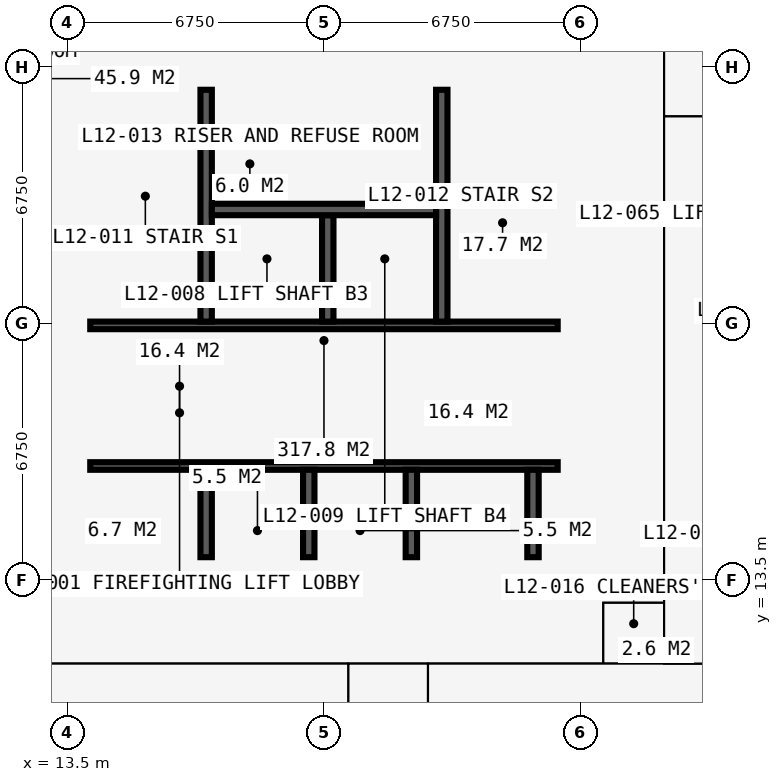
"""IFC4 building model, lengths in metres.
Left out: names, types, materials, properties, quantities, classifications, styles, units other than length and angle.
Written with IfcOpenShell. Run it as: python <this file> out.ifc"""

import sys

from ifc_helpers import new_model, si_unit, direction, frame, frame_2d, origin, place, context, subcontext, project, spatial, rectangle, extrude, element, fill, save


model = new_model("IFC4")
c1 = context("Model", 3, precision=1e-05, world=origin(), true_north=direction((0.0, 1.0)))
c2 = subcontext(c1, "Body", "Model", "MODEL_VIEW")
j1 = project(units=[si_unit("LENGTHUNIT", "METRE"), si_unit("PLANEANGLEUNIT", "RADIAN")], contexts=[c1])
p1 = place(None, origin())
s1 = spatial("IfcSite", under=j1, at=p1, CompositionType="ELEMENT")
p2 = place(p1, origin())
s2 = spatial("IfcBuilding", under=s1, at=p2, CompositionType="ELEMENT")
p3 = place(p2, frame((0.0, 0.0, 46.8)))
s3 = spatial("IfcBuildingStorey", under=s2, at=p3, CompositionType="ELEMENT", Elevation=46.8)
p4 = place(p3, frame((12.9, 13.5, 0.0), z_axis=(0.0, 0.0, 1.0), x_axis=(1.0, 0.0, 0.0)))
e1 = element("IfcWall", 1, at=p4, inside=s3, PredefinedType="SHEAR", context=c2, shape_type="SweptSolid", body=[
    extrude(rectangle(XDim=14.7, YDim=1.2, at=frame_2d((7.35, 0.0))), origin(), (0.0, 0.0, 1.0), 3.6),
])
p5 = place(p3, frame((27.0, 14.1, 0.0), z_axis=(0.0, 0.0, 1.0), x_axis=(0.0, 1.0, 0.0)))
e2 = element("IfcWall", 2, at=p5, inside=s3, PredefinedType="SHEAR", context=c2, shape_type="SweptSolid", body=[
    extrude(rectangle(XDim=12.3, YDim=1.2, at=frame_2d((6.15, 0.0))), origin(), (0.0, 0.0, 1.0), 3.6),
])
p6 = place(p5, frame((3.65, 0.0, 0.0)))
e3 = element("IfcOpeningElement", 3, at=p6, cuts=e2, PredefinedType="OPENING", context=c2, shape_type="SweptSolid", body=[
    extrude(rectangle(XDim=1.2, YDim=2.2, at=frame_2d((0.6, 1.1))), frame((0.0, 0.61, 0.0), z_axis=(0.0, -1.0, 0.0), x_axis=(1.0, 0.0, 0.0)), (0.0, 0.0, 1.0), 1.22),
])
p7 = place(p3, frame((27.6, 27.0, 0.0), z_axis=(0.0, 0.0, 1.0), x_axis=(-1.0, 0.0, 0.0)))
e4 = element("IfcWall", 4, at=p7, inside=s3, PredefinedType="SHEAR", context=c2, shape_type="SweptSolid", body=[
    extrude(rectangle(XDim=14.7, YDim=1.2, at=frame_2d((7.35, 0.0))), origin(), (0.0, 0.0, 1.0), 3.6),
])
p8 = place(p7, frame((5.225, 0.0, 0.0)))
e5 = element("IfcOpeningElement", 5, at=p8, cuts=e4, PredefinedType="OPENING", context=c2, shape_type="SweptSolid", body=[
    extrude(rectangle(XDim=0.9, YDim=2.2, at=frame_2d((0.45, 1.1))), frame((0.0, 0.61, 0.0), z_axis=(0.0, -1.0, 0.0), x_axis=(1.0, 0.0, 0.0)), (0.0, 0.0, 1.0), 1.22),
])
p9 = place(p7, frame((8.2, 0.0, 0.0)))
e6 = element("IfcOpeningElement", 6, at=p9, cuts=e4, PredefinedType="OPENING", context=c2, shape_type="SweptSolid", body=[
    extrude(rectangle(XDim=1.0, YDim=2.2, at=frame_2d((0.5, 1.1))), frame((0.0, 0.61, 0.0), z_axis=(0.0, -1.0, 0.0), x_axis=(1.0, 0.0, 0.0)), (0.0, 0.0, 1.0), 1.22),
])
p10 = place(p3, frame((13.5, 26.4, 0.0), z_axis=(0.0, 0.0, 1.0), x_axis=(0.0, -1.0, 0.0)))
e7 = element("IfcWall", 7, at=p10, inside=s3, PredefinedType="SHEAR", context=c2, shape_type="SweptSolid", body=[
    extrude(rectangle(XDim=12.3, YDim=1.2, at=frame_2d((6.15, 0.0))), origin(), (0.0, 0.0, 1.0), 3.6),
])
p11 = place(p10, frame((7.45, 0.0, 0.0)))
e8 = element("IfcOpeningElement", 8, at=p11, cuts=e7, PredefinedType="OPENING", context=c2, shape_type="SweptSolid", body=[
    extrude(rectangle(XDim=1.2, YDim=2.2, at=frame_2d((0.6, 1.1))), frame((0.0, 0.61, 0.0), z_axis=(0.0, -1.0, 0.0), x_axis=(1.0, 0.0, 0.0)), (0.0, 0.0, 1.0), 1.22),
])
p12 = place(p3, frame((14.1, 16.5, 0.0), z_axis=(0.0, 0.0, 1.0), x_axis=(1.0, 0.0, 0.0)))
e9 = element("IfcWall", 9, at=p12, inside=s3, PredefinedType="SHEAR", context=c2, shape_type="SweptSolid", body=[
    extrude(rectangle(XDim=12.3, YDim=0.2, at=frame_2d((6.15, 0.0))), origin(), (0.0, 0.0, 1.0), 3.6),
])
p13 = place(p12, frame((0.9, 0.0, 0.0)))
e10 = element("IfcOpeningElement", 10, at=p13, cuts=e9, PredefinedType="OPENING", context=c2, shape_type="SweptSolid", body=[
    extrude(rectangle(XDim=1.1, YDim=2.2, at=frame_2d((0.55, 1.1))), frame((0.0, 0.11, 0.0), z_axis=(0.0, -1.0, 0.0), x_axis=(1.0, 0.0, 0.0)), (0.0, 0.0, 1.0), 0.22),
])
p14 = place(p12, frame((9.5, 0.0, 0.0)))
e11 = element("IfcOpeningElement", 11, at=p14, cuts=e9, PredefinedType="OPENING", context=c2, shape_type="SweptSolid", body=[
    extrude(rectangle(XDim=1.1, YDim=2.2, at=frame_2d((0.55, 1.1))), frame((0.0, 0.11, 0.0), z_axis=(0.0, -1.0, 0.0), x_axis=(1.0, 0.0, 0.0)), (0.0, 0.0, 1.0), 0.22),
])
p15 = place(p3, frame((14.1, 20.2, 0.0), z_axis=(0.0, 0.0, 1.0), x_axis=(1.0, 0.0, 0.0)))
e12 = element("IfcWall", 12, at=p15, inside=s3, PredefinedType="SHEAR", context=c2, shape_type="SweptSolid", body=[
    extrude(rectangle(XDim=12.3, YDim=0.2, at=frame_2d((6.15, 0.0))), origin(), (0.0, 0.0, 1.0), 3.6),
])
p16 = place(p15, frame((0.35, 0.0, 0.0)))
e13 = element("IfcOpeningElement", 13, at=p16, cuts=e12, PredefinedType="OPENING", context=c2, shape_type="SweptSolid", body=[
    extrude(rectangle(XDim=1.1, YDim=2.2, at=frame_2d((0.55, 1.1))), frame((0.0, 0.11, 0.0), z_axis=(0.0, -1.0, 0.0), x_axis=(1.0, 0.0, 0.0)), (0.0, 0.0, 1.0), 0.22),
])
p17 = place(p15, frame((9.75, 0.0, 0.0)))
e14 = element("IfcOpeningElement", 14, at=p17, cuts=e12, PredefinedType="OPENING", context=c2, shape_type="SweptSolid", body=[
    extrude(rectangle(XDim=1.1, YDim=2.2, at=frame_2d((0.55, 1.1))), frame((0.0, 0.11, 0.0), z_axis=(0.0, -1.0, 0.0), x_axis=(1.0, 0.0, 0.0)), (0.0, 0.0, 1.0), 0.22),
])
for number, where, z_axis, x_axis in (
    (15, (17.15, 20.3, 0.0), (0.0, 0.0, 1.0), (0.0, 1.0, 0.0)),
    (16, (23.35, 20.3, 0.0), (0.0, 0.0, 1.0), (0.0, 1.0, 0.0)),
):
    element("IfcWall", number, at=place(p3, frame(where, z_axis=z_axis, x_axis=x_axis)), inside=s3, PredefinedType="SHEAR", context=c2, shape_type="SweptSolid", body=[
        extrude(rectangle(XDim=6.1, YDim=0.3, at=frame_2d((3.05, 0.0))), origin(), (0.0, 0.0, 1.0), 3.6),
    ])
p18 = place(p3, frame((20.35, 20.3, 0.0), z_axis=(0.0, 0.0, 1.0), x_axis=(0.0, 1.0, 0.0)))
e17 = element("IfcWall", 17, at=p18, inside=s3, PredefinedType="SHEAR", context=c2, shape_type="SweptSolid", body=[
    extrude(rectangle(XDim=2.8, YDim=0.3, at=frame_2d((1.4, 0.0))), origin(), (0.0, 0.0, 1.0), 3.6),
])
p19 = place(p3, frame((17.3, 23.25, 0.0), z_axis=(0.0, 0.0, 1.0), x_axis=(1.0, 0.0, 0.0)))
e18 = element("IfcWall", 18, at=p19, inside=s3, PredefinedType="SHEAR", context=c2, shape_type="SweptSolid", body=[
    extrude(rectangle(XDim=5.9, YDim=0.3, at=frame_2d((2.95, 0.0))), origin(), (0.0, 0.0, 1.0), 3.6),
])
for number, where, z_axis, x_axis in (
    (19, (17.15, 14.1, 0.0), (0.0, 0.0, 1.0), (0.0, 1.0, 0.0)),
    (20, (19.85, 14.1, 0.0), (0.0, 0.0, 1.0), (0.0, 1.0, 0.0)),
    (21, (22.55, 14.1, 0.0), (0.0, 0.0, 1.0), (0.0, 1.0, 0.0)),
    (22, (25.75, 14.1, 0.0), (0.0, 0.0, 1.0), (0.0, 1.0, 0.0)),
):
    element("IfcWall", number, at=place(p3, frame(where, z_axis=z_axis, x_axis=x_axis)), inside=s3, PredefinedType="SHEAR", context=c2, shape_type="SweptSolid", body=[
        extrude(rectangle(XDim=2.3, YDim=0.3, at=frame_2d((1.15, 0.0))), origin(), (0.0, 0.0, 1.0), 3.6),
    ])
p20 = place(p3, frame((18.875, 16.6, 0.0), z_axis=(0.0, 0.0, 1.0), x_axis=(0.0, 1.0, 0.0)))
e23 = element("IfcWall", 23, at=p20, inside=s3, PredefinedType="PARTITIONING", context=c2, shape_type="SweptSolid", body=[
    extrude(rectangle(XDim=3.5, YDim=0.15, at=frame_2d((1.75, 0.0))), origin(), (0.0, 0.0, 1.0), 3.375),
])
p21 = place(p20, frame((1.15, 0.0, 0.0)))
e24 = element("IfcOpeningElement", 24, at=p21, cuts=e23, PredefinedType="OPENING", context=c2, shape_type="SweptSolid", body=[
    extrude(rectangle(XDim=1.2, YDim=2.2, at=frame_2d((0.6, 1.1))), frame((0.0, 0.085, 0.0), z_axis=(0.0, -1.0, 0.0), x_axis=(1.0, 0.0, 0.0)), (0.0, 0.0, 1.0), 0.17),
])
p22 = place(p3, frame((21.625, 16.6, 0.0), z_axis=(0.0, 0.0, 1.0), x_axis=(0.0, 1.0, 0.0)))
e25 = element("IfcWall", 25, at=p22, inside=s3, PredefinedType="PARTITIONING", context=c2, shape_type="SweptSolid", body=[
    extrude(rectangle(XDim=3.5, YDim=0.15, at=frame_2d((1.75, 0.0))), origin(), (0.0, 0.0, 1.0), 3.375),
])
p23 = place(p22, frame((1.15, 0.0, 0.0)))
e26 = element("IfcOpeningElement", 26, at=p23, cuts=e25, PredefinedType="OPENING", context=c2, shape_type="SweptSolid", body=[
    extrude(rectangle(XDim=1.2, YDim=2.2, at=frame_2d((0.6, 1.1))), frame((0.0, 0.085, 0.0), z_axis=(0.0, -1.0, 0.0), x_axis=(1.0, 0.0, 0.0)), (0.0, 0.0, 1.0), 0.17),
])
p24 = place(p3, frame((19.375, 23.4, 0.0), z_axis=(0.0, 0.0, 1.0), x_axis=(0.0, 1.0, 0.0)))
e27 = element("IfcWall", 27, at=p24, inside=s3, PredefinedType="PARTITIONING", context=c2, shape_type="SweptSolid", body=[
    extrude(rectangle(XDim=3.0, YDim=0.15, at=frame_2d((1.5, 0.0))), origin(), (0.0, 0.0, 1.0), 3.375),
])
p25 = place(p3, frame((10.125, 11.3, 0.0), z_axis=(0.0, 0.0, 1.0), x_axis=(1.0, 0.0, 0.0)))
e28 = element("IfcWall", 28, at=p25, inside=s3, PredefinedType="PARTITIONING", context=c2, shape_type="SweptSolid", body=[
    extrude(rectangle(XDim=20.675, YDim=0.15, at=frame_2d((10.337, 0.0))), origin(), (0.0, 0.0, 1.0), 3.375),
])
p26 = place(p25, frame((11.312, 0.0, 0.0)))
e29 = element("IfcOpeningElement", 29, at=p26, cuts=e28, PredefinedType="OPENING", context=c2, shape_type="SweptSolid", body=[
    extrude(rectangle(XDim=1.0, YDim=2.2, at=frame_2d((0.5, 1.1))), frame((0.0, 0.085, 0.0), z_axis=(0.0, -1.0, 0.0), x_axis=(1.0, 0.0, 0.0)), (0.0, 0.0, 1.0), 0.17),
])
for number, where, z_axis, x_axis in (
    (30, (20.887, 5.65, 0.0), (0.0, 0.0, 1.0), (0.0, 1.0, 0.0)),
    (31, (22.988, 5.65, 0.0), (0.0, 0.0, 1.0), (0.0, 1.0, 0.0)),
):
    element("IfcWall", number, at=place(p3, frame(where, z_axis=z_axis, x_axis=x_axis)), inside=s3, PredefinedType="PARTITIONING", context=c2, shape_type="SweptSolid", body=[
        extrude(rectangle(XDim=5.65, YDim=0.15, at=frame_2d((2.825, 0.0))), origin(), (0.0, 0.0, 1.0), 3.375),
    ])
p27 = place(p3, frame((27.6, 11.3, 0.0), z_axis=(0.0, 0.0, 1.0), x_axis=(0.0, 1.0, 0.0)))
e32 = element("IfcWall", 32, at=p27, inside=s3, PredefinedType="PARTITIONING", context=c2, shape_type="SweptSolid", body=[
    extrude(rectangle(XDim=1.6, YDim=0.15, at=frame_2d((0.8, 0.0))), origin(), (0.0, 0.0, 1.0), 3.375),
])
p28 = place(p27, frame((0.3, 0.0, 0.0)))
e33 = element("IfcOpeningElement", 33, at=p28, cuts=e32, PredefinedType="OPENING", context=c2, shape_type="SweptSolid", body=[
    extrude(rectangle(XDim=0.95, YDim=2.2, at=frame_2d((0.475, 1.1))), frame((0.0, 0.085, 0.0), z_axis=(0.0, -1.0, 0.0), x_axis=(1.0, 0.0, 0.0)), (0.0, 0.0, 1.0), 0.17),
])
p29 = place(p3, frame((27.6, 12.9, 0.0), z_axis=(0.0, 0.0, 1.0), x_axis=(1.0, 0.0, 0.0)))
e34 = element("IfcWall", 34, at=p29, inside=s3, PredefinedType="PARTITIONING", context=c2, shape_type="SweptSolid", body=[
    extrude(rectangle(XDim=1.6, YDim=0.15, at=frame_2d((0.8, 0.0))), origin(), (0.0, 0.0, 1.0), 2.877),
])
p30 = place(p3, frame((29.2, 11.3, 0.0), z_axis=(0.0, 0.0, 1.0), x_axis=(0.0, 1.0, 0.0)))
e35 = element("IfcWall", 35, at=p30, inside=s3, PredefinedType="PARTITIONING", context=c2, shape_type="SweptSolid", body=[
    extrude(rectangle(XDim=20.3, YDim=0.15, at=frame_2d((10.15, 0.0))), origin(), (0.0, 0.0, 1.0), 3.375),
])
p31 = place(p30, frame((8.35, 0.0, 0.0)))
e36 = element("IfcOpeningElement", 36, at=p31, cuts=e35, PredefinedType="OPENING", context=c2, shape_type="SweptSolid", body=[
    extrude(rectangle(XDim=1.2, YDim=2.2, at=frame_2d((0.6, 1.1))), frame((0.0, 0.085, 0.0), z_axis=(0.0, -1.0, 0.0), x_axis=(1.0, 0.0, 0.0)), (0.0, 0.0, 1.0), 0.17),
])
p32 = place(p3, frame((29.2, 25.7, 0.0), z_axis=(0.0, 0.0, 1.0), x_axis=(1.0, 0.0, 0.0)))
e37 = element("IfcWall", 37, at=p32, inside=s3, PredefinedType="SHEAR", context=c2, shape_type="SweptSolid", body=[
    extrude(rectangle(XDim=3.45, YDim=0.1, at=frame_2d((1.725, 0.0))), origin(), (0.0, 0.0, 1.0), 3.375),
])
p33 = place(p13, origin())
e38 = element("IfcDoor", 38, at=p33, inside=s3, OperationType="DOUBLE_DOOR_SLIDING", PredefinedType="DOOR", context=c2, shape_type="SweptSolid", body=[
    extrude(rectangle(XDim=1.1, YDim=2.2, at=frame_2d((0.55, 1.1))), frame((0.0, 0.025, 0.0), z_axis=(0.0, -1.0, 0.0), x_axis=(1.0, 0.0, 0.0)), (0.0, 0.0, 1.0), 0.05),
])
fill(e10, e38)
p34 = place(p14, origin())
e39 = element("IfcDoor", 39, at=p34, inside=s3, OperationType="DOUBLE_DOOR_SLIDING", PredefinedType="DOOR", context=c2, shape_type="SweptSolid", body=[
    extrude(rectangle(XDim=1.1, YDim=2.2, at=frame_2d((0.55, 1.1))), frame((0.0, 0.025, 0.0), z_axis=(0.0, -1.0, 0.0), x_axis=(1.0, 0.0, 0.0)), (0.0, 0.0, 1.0), 0.05),
])
fill(e11, e39)
p35 = place(p11, origin())
e40 = element("IfcDoor", 40, at=p35, inside=s3, OperationType="DOUBLE_DOOR_SINGLE_SWING", PredefinedType="DOOR", context=c2, shape_type="SweptSolid", body=[
    extrude(rectangle(XDim=1.2, YDim=2.2, at=frame_2d((0.6, 1.1))), frame((0.0, 0.025, 0.0), z_axis=(0.0, -1.0, 0.0), x_axis=(1.0, 0.0, 0.0)), (0.0, 0.0, 1.0), 0.05),
])
fill(e8, e40)
p36 = place(p6, origin())
e41 = element("IfcDoor", 41, at=p36, inside=s3, OperationType="DOUBLE_DOOR_SINGLE_SWING", PredefinedType="DOOR", context=c2, shape_type="SweptSolid", body=[
    extrude(rectangle(XDim=1.2, YDim=2.2, at=frame_2d((0.6, 1.1))), frame((0.0, 0.025, 0.0), z_axis=(0.0, -1.0, 0.0), x_axis=(1.0, 0.0, 0.0)), (0.0, 0.0, 1.0), 0.05),
])
fill(e3, e41)
p37 = place(p21, origin())
e42 = element("IfcDoor", 42, at=p37, inside=s3, OperationType="DOUBLE_DOOR_SINGLE_SWING", PredefinedType="DOOR", context=c2, shape_type="SweptSolid", body=[
    extrude(rectangle(XDim=1.2, YDim=2.2, at=frame_2d((0.6, 1.1))), frame((0.0, 0.025, 0.0), z_axis=(0.0, -1.0, 0.0), x_axis=(1.0, 0.0, 0.0)), (0.0, 0.0, 1.0), 0.05),
])
fill(e24, e42)
p38 = place(p23, origin())
e43 = element("IfcDoor", 43, at=p38, inside=s3, OperationType="DOUBLE_DOOR_SINGLE_SWING", PredefinedType="DOOR", context=c2, shape_type="SweptSolid", body=[
    extrude(rectangle(XDim=1.2, YDim=2.2, at=frame_2d((0.6, 1.1))), frame((0.0, 0.025, 0.0), z_axis=(0.0, -1.0, 0.0), x_axis=(1.0, 0.0, 0.0)), (0.0, 0.0, 1.0), 0.05),
])
fill(e26, e43)
p39 = place(p8, origin())
e44 = element("IfcDoor", 44, at=p39, inside=s3, OperationType="SINGLE_SWING_LEFT", PredefinedType="DOOR", context=c2, shape_type="SweptSolid", body=[
    extrude(rectangle(XDim=0.9, YDim=2.2, at=frame_2d((0.45, 1.1))), frame((0.0, 0.4, 0.0), z_axis=(0.0, -1.0, 0.0), x_axis=(1.0, 0.0, 0.0)), (0.0, 0.0, 1.0), 0.8),
])
fill(e5, e44)
p40 = place(p9, origin())
e45 = element("IfcDoor", 45, at=p40, inside=s3, OperationType="SINGLE_SWING_LEFT", PredefinedType="DOOR", context=c2, shape_type="SweptSolid", body=[
    extrude(rectangle(XDim=1.0, YDim=2.2, at=frame_2d((0.5, 1.1))), frame((0.0, 0.025, 0.0), z_axis=(0.0, -1.0, 0.0), x_axis=(1.0, 0.0, 0.0)), (0.0, 0.0, 1.0), 0.05),
])
fill(e6, e45)
p41 = place(p16, origin())
e46 = element("IfcDoor", 46, at=p41, inside=s3, OperationType="SINGLE_SWING_LEFT", PredefinedType="DOOR", context=c2, shape_type="SweptSolid", body=[
    extrude(rectangle(XDim=1.1, YDim=2.2, at=frame_2d((0.55, 1.1))), frame((0.0, 0.025, 0.0), z_axis=(0.0, -1.0, 0.0), x_axis=(1.0, 0.0, 0.0)), (0.0, 0.0, 1.0), 0.05),
])
fill(e13, e46)
p42 = place(p17, origin())
e47 = element("IfcDoor", 47, at=p42, inside=s3, OperationType="SINGLE_SWING_LEFT", PredefinedType="DOOR", context=c2, shape_type="SweptSolid", body=[
    extrude(rectangle(XDim=1.1, YDim=2.2, at=frame_2d((0.55, 1.1))), frame((0.0, 0.025, 0.0), z_axis=(0.0, -1.0, 0.0), x_axis=(1.0, 0.0, 0.0)), (0.0, 0.0, 1.0), 0.05),
])
fill(e14, e47)
p43 = place(p28, origin())
e48 = element("IfcDoor", 48, at=p43, inside=s3, OperationType="SINGLE_SWING_LEFT", PredefinedType="DOOR", context=c2, shape_type="SweptSolid", body=[
    extrude(rectangle(XDim=0.95, YDim=2.2, at=frame_2d((0.475, 1.1))), frame((0.0, 0.025, 0.0), z_axis=(0.0, -1.0, 0.0), x_axis=(1.0, 0.0, 0.0)), (0.0, 0.0, 1.0), 0.05),
])
fill(e33, e48)
p44 = place(p26, origin())
e49 = element("IfcDoor", 49, at=p44, inside=s3, OperationType="SINGLE_SWING_LEFT", PredefinedType="DOOR", context=c2, shape_type="SweptSolid", body=[
    extrude(rectangle(XDim=1.0, YDim=2.2, at=frame_2d((0.5, 1.1))), frame((0.0, 0.025, 0.0), z_axis=(0.0, -1.0, 0.0), x_axis=(1.0, 0.0, 0.0)), (0.0, 0.0, 1.0), 0.05),
])
fill(e29, e49)
p45 = place(p31, origin())
e50 = element("IfcDoor", 50, at=p45, inside=s3, OperationType="DOUBLE_DOOR_SINGLE_SWING", PredefinedType="DOOR", context=c2, shape_type="SweptSolid", body=[
    extrude(rectangle(XDim=1.2, YDim=2.2, at=frame_2d((0.6, 1.1))), frame((0.0, 0.025, 0.0), z_axis=(0.0, -1.0, 0.0), x_axis=(1.0, 0.0, 0.0)), (0.0, 0.0, 1.0), 0.05),
])
fill(e36, e50)
save(model, sys.argv[1])
